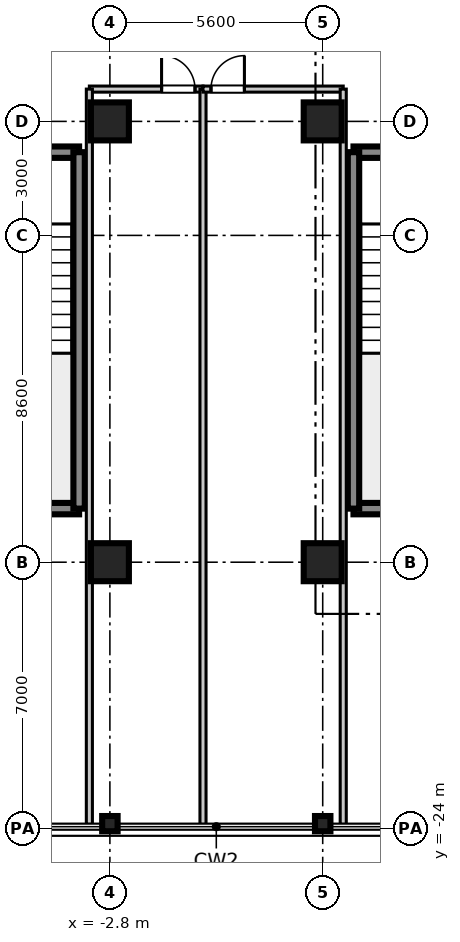
"""IFC4 building model, lengths in metres.
Left out: names, types, materials, properties, quantities, classifications, styles, units other than length and angle.
Written with IfcOpenShell. Run it as: python <this file> out.ifc"""

import sys

from ifc_helpers import new_model, si_unit, direction, frame, frame_2d, origin, origin_2d, place, context, subcontext, project, spatial, rectangle, i_section, extrude, source, transform, mapped, element, fill, save


model = new_model("IFC4")
c1 = context("Model", 3, precision=1e-05, world=origin(), true_north=direction((0.0, 1.0)))
c2 = subcontext(c1, "Body", "Model", "MODEL_VIEW")
j1 = project(units=[si_unit("LENGTHUNIT", "METRE"), si_unit("PLANEANGLEUNIT", "RADIAN")], contexts=[c1])
p1 = place(None, origin())
s1 = spatial("IfcSite", under=j1, at=p1, CompositionType="ELEMENT")
p2 = place(p1, origin())
s2 = spatial("IfcBuilding", under=s1, at=p2, CompositionType="ELEMENT")
p3 = place(p2, frame((0.0, 0.0, 219.7)))
s3 = spatial("IfcBuildingStorey", under=s2, at=p3, CompositionType="ELEMENT", Elevation=219.7)
m1 = source(origin(), c2, "Body", "SweptSolid", [
    extrude(rectangle(XDim=1.0, YDim=1.0, at=origin_2d()), origin(), (0.0, 0.0, 1.0), 3.655),
])
for number, where, z_axis, x_axis in (
    (1, (-2.8, -17.0, 0.0), (0.0, 0.0, 1.0), (1.0, 0.0, 0.0)),
    (2, (-2.8, -5.4, 0.0), (0.0, 0.0, 1.0), (1.0, 0.0, 0.0)),
    (3, (2.8, -17.0, 0.0), (0.0, 0.0, 1.0), (1.0, 0.0, 0.0)),
    (4, (2.8, -5.4, 0.0), (0.0, 0.0, 1.0), (1.0, 0.0, 0.0)),
):
    element("IfcColumn", number, at=place(p3, frame(where, z_axis=z_axis, x_axis=x_axis)), inside=s3, PredefinedType="COLUMN", context=c2, shape_type="MappedRepresentation", body=[
        mapped(m1, transform((0.0, 0.0, 0.0), scale=1.0)),
    ])
m2 = source(origin(), c2, "Body", "SweptSolid", [
    extrude(i_section(OverallWidth=0.401, OverallDepth=0.406, WebThickness=0.016, FlangeThickness=0.025, at=origin_2d()), origin(), (0.0, 0.0, 1.0), 3.655),
])
for number, where, z_axis, x_axis in (
    (5, (-2.8, -23.88, 0.0), (0.0, 0.0, 1.0), (0.0, 1.0, 0.0)),
    (6, (2.8, -23.88, 0.0), (0.0, 0.0, 1.0), (0.0, 1.0, 0.0)),
):
    element("IfcColumn", number, at=place(p3, frame(where, z_axis=z_axis, x_axis=x_axis)), inside=s3, PredefinedType="COLUMN", context=c2, shape_type="MappedRepresentation", body=[
        mapped(m2, transform((0.0, 0.0, 0.0), scale=1.0)),
    ])
m3 = source(origin(), c2, "Body", "SweptSolid", [
    extrude(rectangle(XDim=3.98, YDim=0.3, at=frame_2d((1.99, 0.0))), origin(), (0.0, 0.0, 1.0), 3.41),
])
for number, where, z_axis, x_axis in (
    (7, (3.61, -15.59, 0.0), (0.0, 0.0, 1.0), (1.0, 0.0, 0.0)),
    (8, (3.61, -6.21, 0.0), (0.0, 0.0, 1.0), (1.0, 0.0, 0.0)),
):
    element("IfcWall", number, at=place(p3, frame(where, z_axis=z_axis, x_axis=x_axis)), inside=s3, PredefinedType="SHEAR", context=c2, shape_type="MappedRepresentation", body=[
        mapped(m3, transform((0.0, 0.0, 0.0), scale=1.0)),
    ])
m4 = source(origin(), c2, "Body", "SweptSolid", [
    extrude(rectangle(XDim=9.38, YDim=0.3, at=frame_2d((4.69, 0.0))), origin(), (0.0, 0.0, 1.0), 3.41),
])
p4 = place(p3, frame((3.61, -15.59, 0.0), z_axis=(0.0, 0.0, 1.0), x_axis=(0.0, 1.0, 0.0)))
e9 = element("IfcWall", 9, at=p4, inside=s3, PredefinedType="SHEAR", context=c2, shape_type="MappedRepresentation", body=[
    mapped(m4, transform((0.0, 0.0, 0.0), scale=1.0)),
])
p5 = place(p3, frame((-7.59, -15.59, 0.0), z_axis=(0.0, 0.0, 1.0), x_axis=(1.0, 0.0, 0.0)))
e10 = element("IfcWall", 10, at=p5, inside=s3, PredefinedType="SHEAR", context=c2, shape_type="MappedRepresentation", body=[
    mapped(m3, transform((0.0, 0.0, 0.0), scale=1.0)),
])
p6 = place(p3, frame((-7.59, -6.21, 0.0), z_axis=(0.0, 0.0, 1.0), x_axis=(1.0, 0.0, 0.0)))
e11 = element("IfcWall", 11, at=p6, inside=s3, PredefinedType="SHEAR", context=c2, shape_type="MappedRepresentation", body=[
    mapped(m3, transform((0.0, 0.0, 0.0), scale=1.0)),
])
p7 = place(p6, frame((1.44, 0.0, 0.0)))
e12 = element("IfcOpeningElement", 12, at=p7, cuts=e11, PredefinedType="OPENING", context=c2, shape_type="SweptSolid", body=[
    extrude(rectangle(XDim=1.1, YDim=2.15, at=frame_2d((0.55, 1.075))), frame((0.0, 0.16, 0.0), z_axis=(0.0, -1.0, 0.0), x_axis=(1.0, 0.0, 0.0)), (0.0, 0.0, 1.0), 0.32),
])
p8 = place(p3, frame((-3.61, -15.59, 0.0), z_axis=(0.0, 0.0, 1.0), x_axis=(0.0, 1.0, 0.0)))
e13 = element("IfcWall", 13, at=p8, inside=s3, PredefinedType="SHEAR", context=c2, shape_type="MappedRepresentation", body=[
    mapped(m4, transform((0.0, 0.0, 0.0), scale=1.0)),
])
m5 = source(origin(), c2, "Body", "SweptSolid", [
    extrude(rectangle(XDim=2.99, YDim=0.16, at=frame_2d((1.495, 0.0))), origin(), (0.0, 0.0, 1.0), 2.75),
])
p9 = place(p3, frame((-3.34, -4.55, 0.0), z_axis=(0.0, 0.0, 1.0), x_axis=(1.0, 0.0, 0.0)))
e14 = element("IfcWall", 14, at=p9, inside=s3, PredefinedType="PARTITIONING", context=c2, shape_type="MappedRepresentation", body=[
    mapped(m5, transform((0.0, 0.0, 0.0), scale=1.0)),
])
p10 = place(p9, frame((1.9, 0.0, 0.0)))
e15 = element("IfcOpeningElement", 15, at=p10, cuts=e14, PredefinedType="OPENING", context=c2, shape_type="SweptSolid", body=[
    extrude(rectangle(XDim=0.88, YDim=2.1, at=frame_2d((0.44, 1.05))), frame((0.0, 0.09, 0.0), z_axis=(0.0, -1.0, 0.0), x_axis=(1.0, 0.0, 0.0)), (0.0, 0.0, 1.0), 0.18),
])
m6 = source(origin(), c2, "Body", "SweptSolid", [
    extrude(rectangle(XDim=19.35, YDim=0.16, at=frame_2d((9.675, 0.0))), origin(), (0.0, 0.0, 1.0), 2.75),
])
for number, where, z_axis, x_axis in (
    (16, (-3.34, -23.9, 0.0), (0.0, 0.0, 1.0), (0.0, 1.0, 0.0)),
    (17, (-0.35, -23.9, 0.0), (0.0, 0.0, 1.0), (0.0, 1.0, 0.0)),
):
    element("IfcWall", number, at=place(p3, frame(where, z_axis=z_axis, x_axis=x_axis)), inside=s3, PredefinedType="PARTITIONING", context=c2, shape_type="MappedRepresentation", body=[
        mapped(m6, transform((0.0, 0.0, 0.0), scale=1.0)),
    ])
m7 = source(origin(), c2, "Body", "SweptSolid", [
    extrude(rectangle(XDim=3.69, YDim=0.16, at=frame_2d((1.845, 0.0))), origin(), (0.0, 0.0, 1.0), 2.75),
])
p11 = place(p3, frame((-0.35, -4.55, 0.0), z_axis=(0.0, 0.0, 1.0), x_axis=(1.0, 0.0, 0.0)))
e18 = element("IfcWall", 18, at=p11, inside=s3, PredefinedType="PARTITIONING", context=c2, shape_type="MappedRepresentation", body=[
    mapped(m7, transform((0.0, 0.0, 0.0), scale=1.0)),
])
p12 = place(p11, frame((0.21, 0.0, 0.0)))
e19 = element("IfcOpeningElement", 19, at=p12, cuts=e18, PredefinedType="OPENING", context=c2, shape_type="SweptSolid", body=[
    extrude(rectangle(XDim=0.88, YDim=2.1, at=frame_2d((0.44, 1.05))), frame((0.0, 0.09, 0.0), z_axis=(0.0, -1.0, 0.0), x_axis=(1.0, 0.0, 0.0)), (0.0, 0.0, 1.0), 0.18),
])
p13 = place(p3, frame((3.34, -23.9, 0.0), z_axis=(0.0, 0.0, 1.0), x_axis=(0.0, 1.0, 0.0)))
e20 = element("IfcWall", 20, at=p13, inside=s3, PredefinedType="PARTITIONING", context=c2, shape_type="MappedRepresentation", body=[
    mapped(m6, transform((0.0, 0.0, 0.0), scale=1.0)),
])
m8 = source(origin(), c2, "Body", "SweptSolid", [
    extrude(rectangle(XDim=0.88, YDim=2.1, at=frame_2d((0.44, 1.05))), frame((0.0, 0.025, 0.0), z_axis=(0.0, -1.0, 0.0), x_axis=(1.0, 0.0, 0.0)), (0.0, 0.0, 1.0), 0.05),
])
p14 = place(p10, frame((0.88, 0.0, 0.0), z_axis=(0.0, 0.0, 1.0), x_axis=(-1.0, 0.0, 0.0)))
e21 = element("IfcDoor", 21, at=p14, inside=s3, OperationType="SINGLE_SWING_LEFT", PredefinedType="DOOR", context=c2, shape_type="MappedRepresentation", body=[
    mapped(m8, transform((0.0, 0.0, 0.0), scale=1.0)),
])
fill(e15, e21)
p15 = place(p12, frame((0.88, 0.0, 0.0), z_axis=(0.0, 0.0, 1.0), x_axis=(-1.0, 0.0, 0.0)))
e22 = element("IfcDoor", 22, at=p15, inside=s3, OperationType="SINGLE_SWING_RIGHT", PredefinedType="DOOR", context=c2, shape_type="MappedRepresentation", body=[
    mapped(m8, transform((0.0, 0.0, 0.0), scale=1.0)),
])
fill(e19, e22)
save(model, sys.argv[1])
